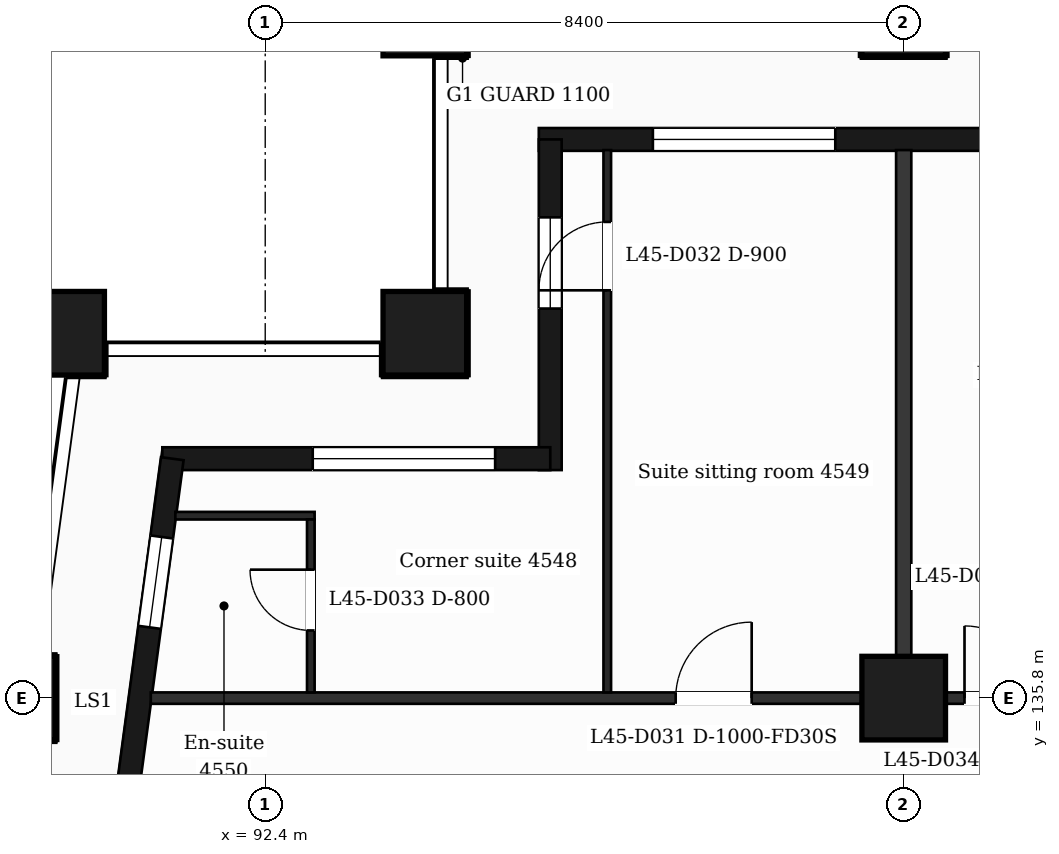
"""IFC4 building model, lengths in metres.
Left out: names, types, materials, properties, quantities, classifications, styles, units other than length and angle.
Written with IfcOpenShell. Run it as: python <this file> out.ifc"""

import sys

from ifc_helpers import new_model, si_unit, direction, frame, frame_2d, origin, origin_2d, place, context, subcontext, project, spatial, rectangle, extrude, element, fill, save


model = new_model("IFC4")
c1 = context("Model", 3, precision=1e-05, world=origin(), true_north=direction((0.0, 1.0)))
c2 = subcontext(c1, "Body", "Model", "MODEL_VIEW")
j1 = project(units=[si_unit("LENGTHUNIT", "METRE"), si_unit("PLANEANGLEUNIT", "RADIAN")], contexts=[c1])
p1 = place(None, origin())
s1 = spatial("IfcSite", under=j1, at=p1, CompositionType="ELEMENT")
p2 = place(p1, origin())
s2 = spatial("IfcBuilding", under=s1, at=p2, CompositionType="ELEMENT")
p3 = place(p2, frame((0.0, 0.0, 188.5)))
s3 = spatial("IfcBuildingStorey", under=s2, at=p3, CompositionType="ELEMENT", Elevation=188.5)
for number, where, z_axis, x_axis in (
    (1, (94.5, 140.6, 0.0), (0.0, 0.0, 1.0), (1.0, 0.0, 0.0)),
    (2, (89.735, 140.6, 0.0), (0.0, 0.0, 1.0), (1.0, 0.0, 0.0)),
    (3, (100.8, 135.8, 0.0), (0.0, 0.0, 1.0), (1.0, 0.0, 0.0)),
    (4, (89.088, 135.8, 0.0), (0.0, 0.0, 1.0), (1.0, 0.0, 0.0)),
    (5, (100.8, 144.8, 0.0), (0.0, 0.0, 1.0), (1.0, 0.0, 0.0)),
    (6, (94.5, 144.8, 0.0), (0.0, 0.0, 1.0), (1.0, 0.0, 0.0)),
):
    element("IfcColumn", number, at=place(p3, frame(where, z_axis=z_axis, x_axis=x_axis)), inside=s3, PredefinedType="COLUMN", context=c2, shape_type="SweptSolid", body=[
        extrude(rectangle(XDim=1.1, YDim=1.1, at=origin_2d()), origin(), (0.0, 0.0, 1.0), 3.7),
    ])
p4 = place(p3, frame((112.5, 143.15, 0.0), z_axis=(0.0, 0.0, 1.0), x_axis=(-1.0, 0.0, 0.0)))
e7 = element("IfcWall", 7, at=p4, inside=s3, PredefinedType="SOLIDWALL", context=c2, shape_type="SweptSolid", body=[
    extrude(rectangle(XDim=16.5, YDim=0.3, at=frame_2d((8.25, 0.0))), origin(), (0.0, 0.0, 1.0), 3.25),
])
p5 = place(p4, frame((0.5, 0.0, 0.9)))
e8 = element("IfcOpeningElement", 8, at=p5, cuts=e7, PredefinedType="OPENING", context=c2, shape_type="SweptSolid", body=[
    extrude(rectangle(XDim=2.4, YDim=2.1, at=frame_2d((1.2, 1.05))), frame((0.0, 0.16, 0.0), z_axis=(0.0, -1.0, 0.0), x_axis=(1.0, 0.0, 0.0)), (0.0, 0.0, 1.0), 0.32),
])
p6 = place(p4, frame((4.2, 0.0, 0.9)))
e9 = element("IfcOpeningElement", 9, at=p6, cuts=e7, PredefinedType="OPENING", context=c2, shape_type="SweptSolid", body=[
    extrude(rectangle(XDim=2.4, YDim=2.1, at=frame_2d((1.2, 1.05))), frame((0.0, 0.16, 0.0), z_axis=(0.0, -1.0, 0.0), x_axis=(1.0, 0.0, 0.0)), (0.0, 0.0, 1.0), 0.32),
])
p7 = place(p4, frame((9.0, 0.0, 0.0)))
e10 = element("IfcOpeningElement", 10, at=p7, cuts=e7, PredefinedType="OPENING", context=c2, shape_type="SweptSolid", body=[
    extrude(rectangle(XDim=1.2, YDim=2.4, at=frame_2d((0.6, 1.2))), frame((0.0, 0.16, 0.0), z_axis=(0.0, -1.0, 0.0), x_axis=(1.0, 0.0, 0.0)), (0.0, 0.0, 1.0), 0.32),
])
p8 = place(p4, frame((12.6, 0.0, 0.9)))
e11 = element("IfcOpeningElement", 11, at=p8, cuts=e7, PredefinedType="OPENING", context=c2, shape_type="SweptSolid", body=[
    extrude(rectangle(XDim=2.4, YDim=2.1, at=frame_2d((1.2, 1.05))), frame((0.0, 0.16, 0.0), z_axis=(0.0, -1.0, 0.0), x_axis=(1.0, 0.0, 0.0)), (0.0, 0.0, 1.0), 0.32),
])
p9 = place(p3, frame((96.15, 143.15, 0.0), z_axis=(0.0, 0.0, 1.0), x_axis=(0.0, -1.0, 0.0)))
e12 = element("IfcWall", 12, at=p9, inside=s3, PredefinedType="SOLIDWALL", context=c2, shape_type="SweptSolid", body=[
    extrude(rectangle(XDim=4.35, YDim=0.3, at=frame_2d((2.175, 0.0))), origin(), (0.0, 0.0, 1.0), 3.25),
])
p10 = place(p9, frame((1.025, 0.0, 0.9)))
e13 = element("IfcOpeningElement", 13, at=p10, cuts=e12, PredefinedType="OPENING", context=c2, shape_type="SweptSolid", body=[
    extrude(rectangle(XDim=1.2, YDim=2.1, at=frame_2d((0.6, 1.05))), frame((0.0, 0.16, 0.0), z_axis=(0.0, -1.0, 0.0), x_axis=(1.0, 0.0, 0.0)), (0.0, 0.0, 1.0), 0.32),
])
p11 = place(p3, frame((96.15, 138.95, 0.0), z_axis=(0.0, 0.0, 1.0), x_axis=(-1.0, 0.0, 0.0)))
e14 = element("IfcWall", 14, at=p11, inside=s3, PredefinedType="SOLIDWALL", context=c2, shape_type="SweptSolid", body=[
    extrude(rectangle(XDim=5.104, YDim=0.3, at=frame_2d((2.552, 0.0))), origin(), (0.0, 0.0, 1.0), 3.25),
])
p12 = place(p11, frame((0.725, 0.0, 0.9)))
e15 = element("IfcOpeningElement", 15, at=p12, cuts=e14, PredefinedType="OPENING", context=c2, shape_type="SweptSolid", body=[
    extrude(rectangle(XDim=2.4, YDim=2.1, at=frame_2d((1.2, 1.05))), frame((0.0, 0.16, 0.0), z_axis=(0.0, -1.0, 0.0), x_axis=(1.0, 0.0, 0.0)), (0.0, 0.0, 1.0), 0.32),
])
p13 = place(p3, frame((91.177, 138.95, 0.0), z_axis=(0.0, 0.0, 1.0), x_axis=(-0.133426664613, -0.991058689065, 0.0)))
e16 = element("IfcWall", 16, at=p13, inside=s3, PredefinedType="SOLIDWALL", context=c2, shape_type="SweptSolid", body=[
    extrude(rectangle(XDim=6.609, YDim=0.3, at=frame_2d((3.305, 0.0))), origin(), (0.0, 0.0, 1.0), 3.25),
])
p14 = place(p13, frame((1.039, 0.0, 0.9)))
e17 = element("IfcOpeningElement", 17, at=p14, cuts=e16, PredefinedType="OPENING", context=c2, shape_type="SweptSolid", body=[
    extrude(rectangle(XDim=1.2, YDim=2.1, at=frame_2d((0.6, 1.05))), frame((0.0, 0.16, 0.0), z_axis=(0.0, -1.0, 0.0), x_axis=(1.0, 0.0, 0.0)), (0.0, 0.0, 1.0), 0.32),
])
p15 = place(p13, frame((4.294, 0.0, 0.0)))
e18 = element("IfcOpeningElement", 18, at=p15, cuts=e16, PredefinedType="OPENING", context=c2, shape_type="SweptSolid", body=[
    extrude(rectangle(XDim=1.2, YDim=2.4, at=frame_2d((0.6, 1.2))), frame((0.0, 0.16, 0.0), z_axis=(0.0, -1.0, 0.0), x_axis=(1.0, 0.0, 0.0)), (0.0, 0.0, 1.0), 0.32),
])
p16 = place(p3, frame((90.895, 135.8, 0.0), z_axis=(0.0, 0.0, 1.0), x_axis=(1.0, 0.0, 0.0)))
e19 = element("IfcWall", 19, at=p16, inside=s3, PredefinedType="PARTITIONING", context=c2, shape_type="SweptSolid", body=[
    extrude(rectangle(XDim=45.011, YDim=0.15, at=frame_2d((22.505, 0.0))), origin(), (0.0, 0.0, 1.0), 3.25),
])
p17 = place(p16, frame((6.906, 0.0, 0.0)))
e20 = element("IfcOpeningElement", 20, at=p17, cuts=e19, PredefinedType="OPENING", context=c2, shape_type="SweptSolid", body=[
    extrude(rectangle(XDim=1.0, YDim=2.1, at=frame_2d((0.5, 1.05))), frame((0.0, 0.085, 0.0), z_axis=(0.0, -1.0, 0.0), x_axis=(1.0, 0.0, 0.0)), (0.0, 0.0, 1.0), 0.17),
])
p18 = place(p16, frame((10.705, 0.0, 0.0)))
e21 = element("IfcOpeningElement", 21, at=p18, cuts=e19, PredefinedType="OPENING", context=c2, shape_type="SweptSolid", body=[
    extrude(rectangle(XDim=0.95, YDim=2.1, at=frame_2d((0.475, 1.05))), frame((0.0, 0.085, 0.0), z_axis=(0.0, -1.0, 0.0), x_axis=(1.0, 0.0, 0.0)), (0.0, 0.0, 1.0), 0.17),
])
p19 = place(p16, frame((16.555, 0.0, 0.0)))
e22 = element("IfcOpeningElement", 22, at=p19, cuts=e19, PredefinedType="OPENING", context=c2, shape_type="SweptSolid", body=[
    extrude(rectangle(XDim=0.95, YDim=2.1, at=frame_2d((0.475, 1.05))), frame((0.0, 0.085, 0.0), z_axis=(0.0, -1.0, 0.0), x_axis=(1.0, 0.0, 0.0)), (0.0, 0.0, 1.0), 0.17),
])
p20 = place(p16, frame((21.095, 0.0, 0.0)))
e23 = element("IfcOpeningElement", 23, at=p20, cuts=e19, PredefinedType="OPENING", context=c2, shape_type="SweptSolid", body=[
    extrude(rectangle(XDim=1.0, YDim=2.1, at=frame_2d((0.5, 1.05))), frame((0.0, 0.085, 0.0), z_axis=(0.0, -1.0, 0.0), x_axis=(1.0, 0.0, 0.0)), (0.0, 0.0, 1.0), 0.17),
])
p21 = place(p16, frame((30.406, 0.0, 0.0)))
e24 = element("IfcOpeningElement", 24, at=p21, cuts=e19, PredefinedType="OPENING", context=c2, shape_type="SweptSolid", body=[
    extrude(rectangle(XDim=1.0, YDim=2.1, at=frame_2d((0.5, 1.05))), frame((0.0, 0.085, 0.0), z_axis=(0.0, -1.0, 0.0), x_axis=(1.0, 0.0, 0.0)), (0.0, 0.0, 1.0), 0.17),
])
p22 = place(p16, frame((36.005, 0.0, 0.0)))
e25 = element("IfcOpeningElement", 25, at=p22, cuts=e19, PredefinedType="OPENING", context=c2, shape_type="SweptSolid", body=[
    extrude(rectangle(XDim=1.0, YDim=2.1, at=frame_2d((0.5, 1.05))), frame((0.0, 0.085, 0.0), z_axis=(0.0, -1.0, 0.0), x_axis=(1.0, 0.0, 0.0)), (0.0, 0.0, 1.0), 0.17),
])
p23 = place(p3, frame((91.218, 138.2, 0.0), z_axis=(0.0, 0.0, 1.0), x_axis=(1.0, 0.0, 0.0)))
e26 = element("IfcWall", 26, at=p23, inside=s3, PredefinedType="PARTITIONING", context=c2, shape_type="SweptSolid", body=[
    extrude(rectangle(XDim=1.832, YDim=0.1, at=frame_2d((0.916, 0.0))), origin(), (0.0, 0.0, 1.0), 3.25),
])
p24 = place(p3, frame((93.0, 135.875, 0.0), z_axis=(0.0, 0.0, 1.0), x_axis=(0.0, 1.0, 0.0)))
e27 = element("IfcWall", 27, at=p24, inside=s3, PredefinedType="PARTITIONING", context=c2, shape_type="SweptSolid", body=[
    extrude(rectangle(XDim=2.275, YDim=0.1, at=frame_2d((1.137, 0.0))), origin(), (0.0, 0.0, 1.0), 3.25),
])
p25 = place(p24, frame((0.815, 0.0, 0.0)))
e28 = element("IfcOpeningElement", 28, at=p25, cuts=e27, PredefinedType="OPENING", context=c2, shape_type="SweptSolid", body=[
    extrude(rectangle(XDim=0.8, YDim=2.1, at=frame_2d((0.4, 1.05))), frame((0.0, 0.06, 0.0), z_axis=(0.0, -1.0, 0.0), x_axis=(1.0, 0.0, 0.0)), (0.0, 0.0, 1.0), 0.12),
])
p26 = place(p3, frame((96.9, 135.875, 0.0), z_axis=(0.0, 0.0, 1.0), x_axis=(0.0, 1.0, 0.0)))
e29 = element("IfcWall", 29, at=p26, inside=s3, PredefinedType="PARTITIONING", context=c2, shape_type="SweptSolid", body=[
    extrude(rectangle(XDim=7.135, YDim=0.1, at=frame_2d((3.567, 0.0))), origin(), (0.0, 0.0, 1.0), 3.25),
])
p27 = place(p26, frame((5.29, 0.0, 0.0)))
e30 = element("IfcOpeningElement", 30, at=p27, cuts=e29, PredefinedType="OPENING", context=c2, shape_type="SweptSolid", body=[
    extrude(rectangle(XDim=0.9, YDim=2.1, at=frame_2d((0.45, 1.05))), frame((0.0, 0.06, 0.0), z_axis=(0.0, -1.0, 0.0), x_axis=(1.0, 0.0, 0.0)), (0.0, 0.0, 1.0), 0.12),
])
p28 = place(p3, frame((100.8, 135.875, 0.0), z_axis=(0.0, 0.0, 1.0), x_axis=(0.0, 1.0, 0.0)))
e31 = element("IfcWall", 31, at=p28, inside=s3, PredefinedType="PARTITIONING", context=c2, shape_type="SweptSolid", body=[
    extrude(rectangle(XDim=7.135, YDim=0.2, at=frame_2d((3.567, 0.0))), origin(), (0.0, 0.0, 1.0), 3.25),
])
p29 = place(p8, origin())
e32 = element("IfcWindow", 32, at=p29, inside=s3, PartitioningType="SINGLE_PANEL", PredefinedType="WINDOW", context=c2, shape_type="SweptSolid", body=[
    extrude(rectangle(XDim=2.4, YDim=2.1, at=frame_2d((1.2, 1.05))), frame((0.0, 0.03, 0.0), z_axis=(0.0, -1.0, 0.0), x_axis=(1.0, 0.0, 0.0)), (0.0, 0.0, 1.0), 0.06),
])
fill(e11, e32)
p30 = place(p10, origin())
e33 = element("IfcWindow", 33, at=p30, inside=s3, PartitioningType="SINGLE_PANEL", PredefinedType="WINDOW", context=c2, shape_type="SweptSolid", body=[
    extrude(rectangle(XDim=1.2, YDim=2.1, at=frame_2d((0.6, 1.05))), frame((0.0, 0.03, 0.0), z_axis=(0.0, -1.0, 0.0), x_axis=(1.0, 0.0, 0.0)), (0.0, 0.0, 1.0), 0.06),
])
fill(e13, e33)
p31 = place(p12, origin())
e34 = element("IfcWindow", 34, at=p31, inside=s3, PartitioningType="SINGLE_PANEL", PredefinedType="WINDOW", context=c2, shape_type="SweptSolid", body=[
    extrude(rectangle(XDim=2.4, YDim=2.1, at=frame_2d((1.2, 1.05))), frame((0.0, 0.03, 0.0), z_axis=(0.0, -1.0, 0.0), x_axis=(1.0, 0.0, 0.0)), (0.0, 0.0, 1.0), 0.06),
])
fill(e15, e34)
p32 = place(p14, origin())
e35 = element("IfcWindow", 35, at=p32, inside=s3, PartitioningType="SINGLE_PANEL", PredefinedType="WINDOW", context=c2, shape_type="SweptSolid", body=[
    extrude(rectangle(XDim=1.2, YDim=2.1, at=frame_2d((0.6, 1.05))), frame((0.0, 0.03, 0.0), z_axis=(0.0, -1.0, 0.0), x_axis=(1.0, 0.0, 0.0)), (0.0, 0.0, 1.0), 0.06),
])
fill(e17, e35)
p33 = place(p17, origin())
e36 = element("IfcDoor", 36, at=p33, inside=s3, OperationType="SINGLE_SWING_RIGHT", PredefinedType="DOOR", context=c2, shape_type="SweptSolid", body=[
    extrude(rectangle(XDim=1.0, YDim=2.1, at=frame_2d((0.5, 1.05))), frame((0.0, 0.025, 0.0), z_axis=(0.0, -1.0, 0.0), x_axis=(1.0, 0.0, 0.0)), (0.0, 0.0, 1.0), 0.05),
])
fill(e20, e36)
p34 = place(p27, origin())
e37 = element("IfcDoor", 37, at=p34, inside=s3, OperationType="SINGLE_SWING_LEFT", PredefinedType="DOOR", context=c2, shape_type="SweptSolid", body=[
    extrude(rectangle(XDim=0.9, YDim=2.1, at=frame_2d((0.45, 1.05))), frame((0.0, 0.025, 0.0), z_axis=(0.0, -1.0, 0.0), x_axis=(1.0, 0.0, 0.0)), (0.0, 0.0, 1.0), 0.05),
])
fill(e30, e37)
p35 = place(p25, origin())
e38 = element("IfcDoor", 38, at=p35, inside=s3, OperationType="SINGLE_SWING_RIGHT", PredefinedType="DOOR", context=c2, shape_type="SweptSolid", body=[
    extrude(rectangle(XDim=0.8, YDim=2.1, at=frame_2d((0.4, 1.05))), frame((0.0, 0.025, 0.0), z_axis=(0.0, -1.0, 0.0), x_axis=(1.0, 0.0, 0.0)), (0.0, 0.0, 1.0), 0.05),
])
fill(e28, e38)
p36 = place(p18, origin())
e39 = element("IfcDoor", 39, at=p36, inside=s3, OperationType="SINGLE_SWING_LEFT", PredefinedType="DOOR", context=c2, shape_type="SweptSolid", body=[
    extrude(rectangle(XDim=0.95, YDim=2.1, at=frame_2d((0.475, 1.05))), frame((0.0, 0.025, 0.0), z_axis=(0.0, -1.0, 0.0), x_axis=(1.0, 0.0, 0.0)), (0.0, 0.0, 1.0), 0.05),
])
fill(e21, e39)
save(model, sys.argv[1])
